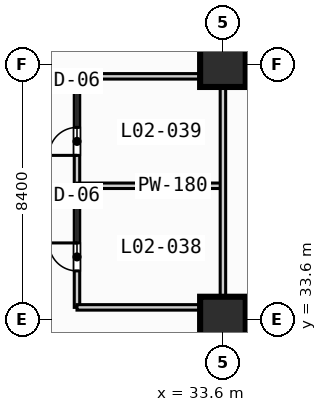
"""IFC4 building model, lengths in metres.
Left out: names, types, materials, properties, quantities, classifications, styles, units other than length and angle.
Written with IfcOpenShell. Run it as: python <this file> out.ifc"""

import sys

from ifc_helpers import new_model, si_unit, direction, frame, frame_2d, origin, origin_2d, place, context, subcontext, project, spatial, rectangle, extrude, element, fill, save


model = new_model("IFC4")
c1 = context("Model", 3, precision=1e-05, world=origin(), true_north=direction((0.0, 1.0)))
c2 = subcontext(c1, "Body", "Model", "MODEL_VIEW")
j1 = project(units=[si_unit("LENGTHUNIT", "METRE"), si_unit("PLANEANGLEUNIT", "RADIAN")], contexts=[c1])
p1 = place(None, origin())
s1 = spatial("IfcSite", under=j1, at=p1, CompositionType="ELEMENT")
p2 = place(p1, origin())
s2 = spatial("IfcBuilding", under=s1, at=p2, CompositionType="ELEMENT")
p3 = place(p2, frame((0.0, 0.0, 10.8)))
s3 = spatial("IfcBuildingStorey", under=s2, at=p3, CompositionType="ELEMENT", Elevation=10.8)
for number, where, z_axis, x_axis in (
    (1, (33.6, 33.6, 0.0), (0.0, 0.0, 1.0), (1.0, 0.0, 0.0)),
    (2, (33.6, 42.0, 0.0), (0.0, 0.0, 1.0), (1.0, 0.0, 0.0)),
):
    element("IfcColumn", number, at=place(p3, frame(where, z_axis=z_axis, x_axis=x_axis)), inside=s3, PredefinedType="COLUMN", context=c2, shape_type="SweptSolid", body=[
        extrude(rectangle(XDim=1.5, YDim=1.5, at=origin_2d()), origin(), (0.0, 0.0, 1.0), 4.8),
    ])
p4 = place(p3, frame((28.8, 34.0, 0.0), z_axis=(0.0, 0.0, 1.0), x_axis=(0.0, 1.0, 0.0)))
e3 = element("IfcWall", 3, at=p4, inside=s3, PredefinedType="PLUMBINGWALL", context=c2, shape_type="SweptSolid", body=[
    extrude(rectangle(XDim=7.6, YDim=0.18, at=frame_2d((3.8, 0.0))), origin(), (0.0, 0.0, 1.0), 4.45),
])
p5 = place(p4, frame((1.2, 0.0, 0.0)))
e4 = element("IfcOpeningElement", 4, at=p5, cuts=e3, PredefinedType="OPENING", context=c2, shape_type="SweptSolid", body=[
    extrude(rectangle(XDim=0.92, YDim=2.1, at=frame_2d((0.46, 1.05))), frame((0.0, 0.1, 0.0), z_axis=(0.0, -1.0, 0.0), x_axis=(1.0, 0.0, 0.0)), (0.0, 0.0, 1.0), 0.2),
])
p6 = place(p4, frame((5.0, 0.0, 0.0)))
e5 = element("IfcOpeningElement", 5, at=p6, cuts=e3, PredefinedType="OPENING", context=c2, shape_type="SweptSolid", body=[
    extrude(rectangle(XDim=0.92, YDim=2.1, at=frame_2d((0.46, 1.05))), frame((0.0, 0.1, 0.0), z_axis=(0.0, -1.0, 0.0), x_axis=(1.0, 0.0, 0.0)), (0.0, 0.0, 1.0), 0.2),
])
p7 = place(p3, frame((28.8, 38.0, 0.0), z_axis=(0.0, 0.0, 1.0), x_axis=(1.0, 0.0, 0.0)))
e6 = element("IfcWall", 6, at=p7, inside=s3, PredefinedType="PLUMBINGWALL", context=c2, shape_type="SweptSolid", body=[
    extrude(rectangle(XDim=4.8, YDim=0.18, at=frame_2d((2.4, 0.0))), origin(), (0.0, 0.0, 1.0), 4.45),
])
p8 = place(p3, frame((33.6, 34.0, 0.0), z_axis=(0.0, 0.0, 1.0), x_axis=(0.0, 1.0, 0.0)))
e7 = element("IfcWall", 7, at=p8, inside=s3, PredefinedType="PLUMBINGWALL", context=c2, shape_type="SweptSolid", body=[
    extrude(rectangle(XDim=7.6, YDim=0.18, at=frame_2d((3.8, 0.0))), origin(), (0.0, 0.0, 1.0), 3.839),
])
p9 = place(p3, frame((28.8, 34.0, 0.0), z_axis=(0.0, 0.0, 1.0), x_axis=(1.0, 0.0, 0.0)))
e8 = element("IfcWall", 8, at=p9, inside=s3, PredefinedType="PLUMBINGWALL", context=c2, shape_type="SweptSolid", body=[
    extrude(rectangle(XDim=4.8, YDim=0.18, at=frame_2d((2.4, 0.0))), origin(), (0.0, 0.0, 1.0), 4.45),
])
p10 = place(p3, frame((28.8, 41.6, 0.0), z_axis=(0.0, 0.0, 1.0), x_axis=(1.0, 0.0, 0.0)))
e9 = element("IfcWall", 9, at=p10, inside=s3, PredefinedType="PLUMBINGWALL", context=c2, shape_type="SweptSolid", body=[
    extrude(rectangle(XDim=4.8, YDim=0.18, at=frame_2d((2.4, 0.0))), origin(), (0.0, 0.0, 1.0), 3.6),
])
p11 = place(p5, origin())
e10 = element("IfcDoor", 10, at=p11, inside=s3, OperationType="SINGLE_SWING_RIGHT", PredefinedType="DOOR", context=c2, shape_type="SweptSolid", body=[
    extrude(rectangle(XDim=0.92, YDim=2.1, at=frame_2d((0.46, 1.05))), frame((0.0, 0.025, 0.0), z_axis=(0.0, -1.0, 0.0), x_axis=(1.0, 0.0, 0.0)), (0.0, 0.0, 1.0), 0.05),
])
fill(e4, e10)
p12 = place(p6, origin())
e11 = element("IfcDoor", 11, at=p12, inside=s3, OperationType="SINGLE_SWING_LEFT", PredefinedType="DOOR", context=c2, shape_type="SweptSolid", body=[
    extrude(rectangle(XDim=0.92, YDim=2.1, at=frame_2d((0.46, 1.05))), frame((0.0, 0.025, 0.0), z_axis=(0.0, -1.0, 0.0), x_axis=(1.0, 0.0, 0.0)), (0.0, 0.0, 1.0), 0.05),
])
fill(e5, e11)
save(model, sys.argv[1])
